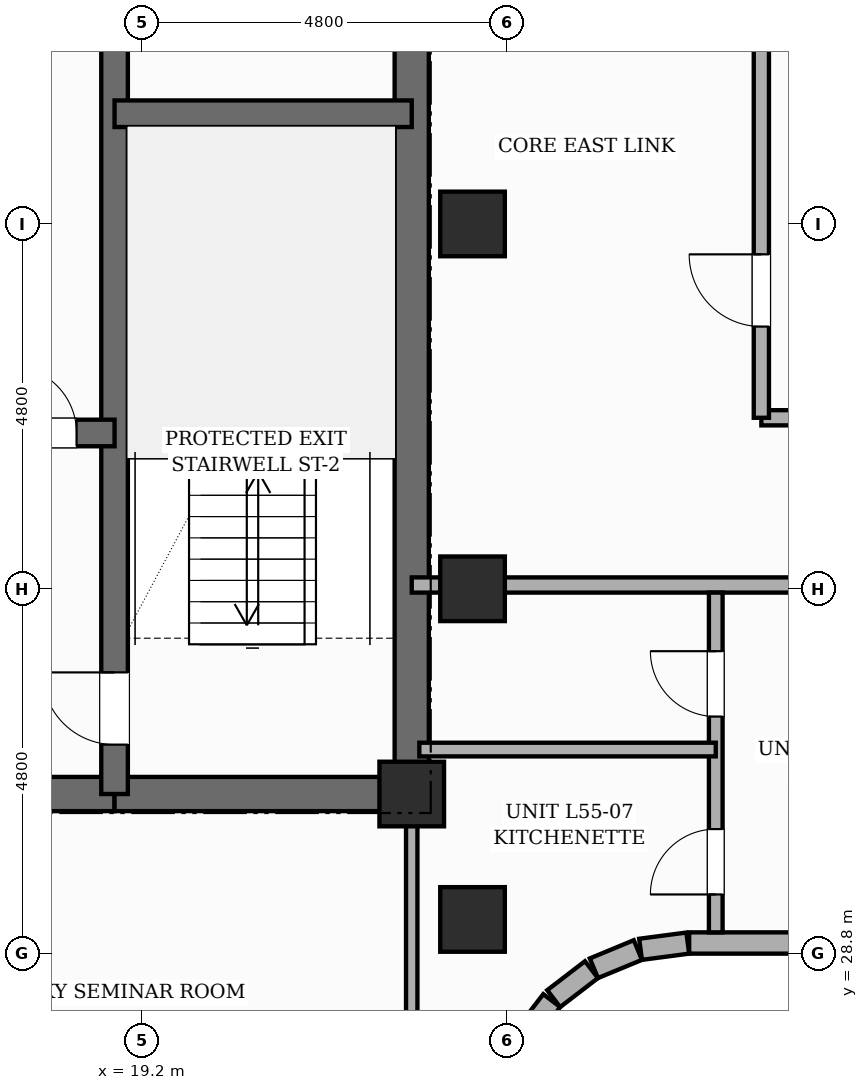
"""IFC4 building model, lengths in metres.
Left out: names, types, materials, properties, quantities, classifications, styles, units other than length and angle.
Written with IfcOpenShell. Run it as: python <this file> out.ifc"""

import sys

from ifc_helpers import new_model, si_unit, direction, frame, frame_2d, origin, origin_2d, place, context, subcontext, project, spatial, rectangle, extrude, element, fill, save


model = new_model("IFC4")
c1 = context("Model", 3, precision=1e-05, world=origin(), true_north=direction((0.0, 1.0)))
c2 = subcontext(c1, "Body", "Model", "MODEL_VIEW")
j1 = project(units=[si_unit("LENGTHUNIT", "METRE"), si_unit("PLANEANGLEUNIT", "RADIAN")], contexts=[c1])
p1 = place(None, origin())
s1 = spatial("IfcSite", under=j1, at=p1, CompositionType="ELEMENT")
p2 = place(p1, origin())
s2 = spatial("IfcBuilding", under=s1, at=p2, CompositionType="ELEMENT")
p3 = place(p2, frame((0.0, 0.0, 211.0)))
s3 = spatial("IfcBuildingStorey", under=s2, at=p3, CompositionType="ELEMENT", Elevation=211.0)
p4 = place(p3, frame((22.75, 30.675, 0.0), z_axis=(0.0, 0.0, 1.0), x_axis=(0.0, 1.0, 0.0)))
e1 = element("IfcWall", 1, at=p4, inside=s3, PredefinedType="SHEAR", context=c2, shape_type="SweptSolid", body=[
    extrude(rectangle(XDim=15.35, YDim=0.45, at=frame_2d((7.675, 0.0))), origin(), (0.0, 0.0, 1.0), 3.6),
])
p5 = place(p4, frame((10.675, 0.0, 0.0)))
e2 = element("IfcOpeningElement", 2, at=p5, cuts=e1, PredefinedType="OPENING", context=c2, shape_type="SweptSolid", body=[
    extrude(rectangle(XDim=1.0, YDim=2.15, at=frame_2d((0.5, 1.075))), frame((0.0, 0.235, 0.0), z_axis=(0.0, -1.0, 0.0), x_axis=(1.0, 0.0, 0.0)), (0.0, 0.0, 1.0), 0.47),
])
p6 = place(p3, frame((9.96, 30.9, 0.0), z_axis=(0.0, 0.0, 1.0), x_axis=(1.0, 0.0, 0.0)))
e3 = element("IfcWall", 3, at=p6, inside=s3, PredefinedType="SHEAR", context=c2, shape_type="SweptSolid", body=[
    extrude(rectangle(XDim=8.88, YDim=0.45, at=frame_2d((4.44, 0.0))), origin(), (0.0, 0.0, 1.0), 3.6),
])
p7 = place(p6, frame((4.09, 0.0, 0.0)))
e4 = element("IfcOpeningElement", 4, at=p7, cuts=e3, PredefinedType="OPENING", context=c2, shape_type="SweptSolid", body=[
    extrude(rectangle(XDim=1.0, YDim=2.15, at=frame_2d((0.5, 1.075))), frame((0.0, 0.235, 0.0), z_axis=(0.0, -1.0, 0.0), x_axis=(1.0, 0.0, 0.0)), (0.0, 0.0, 1.0), 0.47),
])
p8 = place(p3, frame((18.84, 30.9, 0.0), z_axis=(0.0, 0.0, 1.0), x_axis=(1.0, 0.0, 0.0)))
e5 = element("IfcWall", 5, at=p8, inside=s3, PredefinedType="SHEAR", context=c2, shape_type="SweptSolid", body=[
    extrude(rectangle(XDim=3.91, YDim=0.45, at=frame_2d((1.955, 0.0))), origin(), (0.0, 0.0, 1.0), 3.6),
])
p9 = place(p3, frame((18.84, 30.9, 0.0), z_axis=(0.0, 0.0, 1.0), x_axis=(0.0, 1.0, 0.0)))
e6 = element("IfcWall", 6, at=p9, inside=s3, PredefinedType="SHEAR", context=c2, shape_type="SweptSolid", body=[
    extrude(rectangle(XDim=14.9, YDim=0.35, at=frame_2d((7.45, 0.0))), origin(), (0.0, 0.0, 1.0), 3.6),
])
p10 = place(p9, frame((0.65, 0.0, 0.0)))
e7 = element("IfcOpeningElement", 7, at=p10, cuts=e6, PredefinedType="OPENING", context=c2, shape_type="SweptSolid", body=[
    extrude(rectangle(XDim=0.95, YDim=2.1, at=frame_2d((0.475, 1.05))), frame((0.0, 0.185, 0.0), z_axis=(0.0, -1.0, 0.0), x_axis=(1.0, 0.0, 0.0)), (0.0, 0.0, 1.0), 0.37),
])
p11 = place(p9, frame((10.45, 0.0, 0.0)))
e8 = element("IfcOpeningElement", 8, at=p11, cuts=e6, PredefinedType="OPENING", context=c2, shape_type="SweptSolid", body=[
    extrude(rectangle(XDim=1.0, YDim=2.15, at=frame_2d((0.5, 1.075))), frame((0.0, 0.185, 0.0), z_axis=(0.0, -1.0, 0.0), x_axis=(1.0, 0.0, 0.0)), (0.0, 0.0, 1.0), 0.37),
])
p12 = place(p3, frame((18.84, 39.85, 0.0), z_axis=(0.0, 0.0, 1.0), x_axis=(1.0, 0.0, 0.0)))
e9 = element("IfcWall", 9, at=p12, inside=s3, PredefinedType="SHEAR", context=c2, shape_type="SweptSolid", body=[
    extrude(rectangle(XDim=3.91, YDim=0.35, at=frame_2d((1.955, 0.0))), origin(), (0.0, 0.0, 1.0), 3.6),
])
p13 = place(p3, frame((9.96, 35.65, 0.0), z_axis=(0.0, 0.0, 1.0), x_axis=(1.0, 0.0, 0.0)))
e10 = element("IfcWall", 10, at=p13, inside=s3, PredefinedType="SHEAR", context=c2, shape_type="SweptSolid", body=[
    extrude(rectangle(XDim=8.88, YDim=0.35, at=frame_2d((4.44, 0.0))), origin(), (0.0, 0.0, 1.0), 3.6),
])
p14 = place(p13, frame((0.84, 0.0, 0.0)))
e11 = element("IfcOpeningElement", 11, at=p14, cuts=e10, PredefinedType="OPENING", context=c2, shape_type="SweptSolid", body=[
    extrude(rectangle(XDim=1.1, YDim=2.15, at=frame_2d((0.55, 1.075))), frame((0.0, 0.185, 0.0), z_axis=(0.0, -1.0, 0.0), x_axis=(1.0, 0.0, 0.0)), (0.0, 0.0, 1.0), 0.37),
])
p15 = place(p13, frame((5.24, 0.0, 0.0)))
e12 = element("IfcOpeningElement", 12, at=p15, cuts=e10, PredefinedType="OPENING", context=c2, shape_type="SweptSolid", body=[
    extrude(rectangle(XDim=1.1, YDim=2.15, at=frame_2d((0.55, 1.075))), frame((0.0, 0.185, 0.0), z_axis=(0.0, -1.0, 0.0), x_axis=(1.0, 0.0, 0.0)), (0.0, 0.0, 1.0), 0.37),
])
p16 = place(p13, frame((7.5, 0.0, 0.0)))
e13 = element("IfcOpeningElement", 13, at=p16, cuts=e10, PredefinedType="OPENING", context=c2, shape_type="SweptSolid", body=[
    extrude(rectangle(XDim=0.88, YDim=2.1, at=frame_2d((0.44, 1.05))), frame((0.0, 0.185, 0.0), z_axis=(0.0, -1.0, 0.0), x_axis=(1.0, 0.0, 0.0)), (0.0, 0.0, 1.0), 0.37),
])
for number, where, z_axis, x_axis in (
    (14, (22.75, 30.9, 0.0), (0.0, 0.0, 1.0), (1.0, 0.0, 0.0)),
    (15, (23.55, 29.25, 0.0), (0.0, 0.0, 1.0), (1.0, 0.0, 0.0)),
    (16, (23.55, 33.6, 0.0), (0.0, 0.0, 1.0), (1.0, 0.0, 0.0)),
    (17, (23.55, 38.4, 0.0), (0.0, 0.0, 1.0), (1.0, 0.0, 0.0)),
):
    element("IfcColumn", number, at=place(p3, frame(where, z_axis=z_axis, x_axis=x_axis)), inside=s3, PredefinedType="COLUMN", context=c2, shape_type="SweptSolid", body=[
        extrude(rectangle(XDim=0.85, YDim=0.85, at=origin_2d()), origin(), (0.0, 0.0, 1.0), 3.6),
    ])
p17 = place(p3, frame((50.4, 28.94, 0.0), z_axis=(0.0, 0.0, 1.0), x_axis=(-1.0, 0.0, 0.0)))
e18 = element("IfcWall", 18, at=p17, inside=s3, PredefinedType="STANDARD", context=c2, shape_type="SweptSolid", body=[
    extrude(rectangle(XDim=24.0, YDim=0.28, at=frame_2d((12.0, 0.0))), origin(), (0.0, 0.0, 1.0), 2.66),
])
p18 = place(p17, frame((19.177, 0.0, 0.65)))
e19 = element("IfcOpeningElement", 19, at=p18, cuts=e18, PredefinedType="OPENING", context=c2, shape_type="SweptSolid", body=[
    extrude(rectangle(XDim=1.4, YDim=1.1, at=frame_2d((0.7, 0.55))), frame((0.0, 0.15, 0.0), z_axis=(0.0, -1.0, 0.0), x_axis=(1.0, 0.0, 0.0)), (0.0, 0.0, 1.0), 0.3),
])
p19 = place(p17, frame((14.481, 0.0, 0.65)))
e20 = element("IfcOpeningElement", 20, at=p19, cuts=e18, PredefinedType="OPENING", context=c2, shape_type="SweptSolid", body=[
    extrude(rectangle(XDim=1.4, YDim=1.1, at=frame_2d((0.7, 0.55))), frame((0.0, 0.15, 0.0), z_axis=(0.0, -1.0, 0.0), x_axis=(1.0, 0.0, 0.0)), (0.0, 0.0, 1.0), 0.3),
])
p20 = place(p17, frame((4.847, 0.0, 0.65)))
e21 = element("IfcOpeningElement", 21, at=p20, cuts=e18, PredefinedType="OPENING", context=c2, shape_type="SweptSolid", body=[
    extrude(rectangle(XDim=1.4, YDim=1.1, at=frame_2d((0.7, 0.55))), frame((0.0, 0.15, 0.0), z_axis=(0.0, -1.0, 0.0), x_axis=(1.0, 0.0, 0.0)), (0.0, 0.0, 1.0), 0.3),
])
p21 = place(p17, frame((9.377, 0.0, 0.65)))
e22 = element("IfcOpeningElement", 22, at=p21, cuts=e18, PredefinedType="OPENING", context=c2, shape_type="SweptSolid", body=[
    extrude(rectangle(XDim=1.4, YDim=1.1, at=frame_2d((0.7, 0.55))), frame((0.0, 0.15, 0.0), z_axis=(0.0, -1.0, 0.0), x_axis=(1.0, 0.0, 0.0)), (0.0, 0.0, 1.0), 0.3),
])
p22 = place(p17, frame((0.308, 0.0, 0.65)))
e23 = element("IfcOpeningElement", 23, at=p22, cuts=e18, PredefinedType="OPENING", context=c2, shape_type="SweptSolid", body=[
    extrude(rectangle(XDim=1.4, YDim=1.1, at=frame_2d((0.7, 0.55))), frame((0.0, 0.15, 0.0), z_axis=(0.0, -1.0, 0.0), x_axis=(1.0, 0.0, 0.0)), (0.0, 0.0, 1.0), 0.3),
])
p23 = place(p3, frame((26.382, 28.939, 0.0), z_axis=(0.0, 0.0, 1.0), x_axis=(-0.9914410257, -0.130555323746, 0.0)))
e24 = element("IfcWall", 24, at=p23, inside=s3, PredefinedType="STANDARD", context=c2, shape_type="SweptSolid", body=[
    extrude(rectangle(XDim=0.626, YDim=0.28, at=frame_2d((0.313, 0.0))), origin(), (0.0, 0.0, 1.0), 3.38),
])
p24 = place(p3, frame((25.725, 28.847, 0.0), z_axis=(0.0, 0.0, 1.0), x_axis=(-0.923974080304, -0.382455093999, 0.0)))
e25 = element("IfcWall", 25, at=p24, inside=s3, PredefinedType="STANDARD", context=c2, shape_type="SweptSolid", body=[
    extrude(rectangle(XDim=0.626, YDim=0.28, at=frame_2d((0.313, 0.0))), origin(), (0.0, 0.0, 1.0), 3.38),
])
for number, where, z_axis, x_axis in (
    (26, (25.115, 28.59, 0.0), (0.0, 0.0, 1.0), (-0.793, -0.609, 0.0)),
    (27, (24.592, 28.182, 0.0), (0.0, 0.0, 1.0), (-0.609, -0.793, 0.0)),
):
    element("IfcWall", number, at=place(p3, frame(where, z_axis=z_axis, x_axis=x_axis)), inside=s3, PredefinedType="STANDARD", context=c2, shape_type="SweptSolid", body=[
        extrude(rectangle(XDim=0.626, YDim=0.28, at=frame_2d((0.313, 0.0))), origin(), (0.0, 0.0, 1.0), 3.38),
    ])
p25 = place(p3, frame((22.75, 25.75, 0.0), z_axis=(0.0, 0.0, 1.0), x_axis=(0.0, 1.0, 0.0)))
e28 = element("IfcWall", 28, at=p25, inside=s3, PredefinedType="PARTITIONING", context=c2, shape_type="SweptSolid", body=[
    extrude(rectangle(XDim=5.15, YDim=0.15, at=frame_2d((2.575, 0.0))), origin(), (0.0, 0.0, 1.0), 3.38),
])
p26 = place(p3, frame((22.75, 33.65, 0.0), z_axis=(0.0, 0.0, 1.0), x_axis=(1.0, 0.0, 0.0)))
e29 = element("IfcWall", 29, at=p26, inside=s3, PredefinedType="PARTITIONING", context=c2, shape_type="SweptSolid", body=[
    extrude(rectangle(XDim=29.77, YDim=0.2, at=frame_2d((14.885, 0.0))), origin(), (0.0, 0.0, 1.0), 3.38),
])
p27 = place(p26, frame((5.995, 0.0, 0.0)))
e30 = element("IfcOpeningElement", 30, at=p27, cuts=e29, PredefinedType="OPENING", context=c2, shape_type="SweptSolid", body=[
    extrude(rectangle(XDim=0.98, YDim=2.18, at=frame_2d((0.49, 1.09))), frame((0.0, 0.11, 0.0), z_axis=(0.0, -1.0, 0.0), x_axis=(1.0, 0.0, 0.0)), (0.0, 0.0, 1.0), 0.22),
])
p28 = place(p26, frame((10.896, 0.0, 0.0)))
e31 = element("IfcOpeningElement", 31, at=p28, cuts=e29, PredefinedType="OPENING", context=c2, shape_type="SweptSolid", body=[
    extrude(rectangle(XDim=0.98, YDim=2.18, at=frame_2d((0.49, 1.09))), frame((0.0, 0.11, 0.0), z_axis=(0.0, -1.0, 0.0), x_axis=(1.0, 0.0, 0.0)), (0.0, 0.0, 1.0), 0.22),
])
p29 = place(p26, frame((20.73, 0.0, 0.0)))
e32 = element("IfcOpeningElement", 32, at=p29, cuts=e29, PredefinedType="OPENING", context=c2, shape_type="SweptSolid", body=[
    extrude(rectangle(XDim=0.98, YDim=2.18, at=frame_2d((0.49, 1.09))), frame((0.0, 0.11, 0.0), z_axis=(0.0, -1.0, 0.0), x_axis=(1.0, 0.0, 0.0)), (0.0, 0.0, 1.0), 0.22),
])
p30 = place(p3, frame((27.35, 35.85, 0.0), z_axis=(0.0, 0.0, 1.0), x_axis=(1.0, 0.0, 0.0)))
e33 = element("IfcWall", 33, at=p30, inside=s3, PredefinedType="PARTITIONING", context=c2, shape_type="SweptSolid", body=[
    extrude(rectangle(XDim=14.43, YDim=0.2, at=frame_2d((7.215, 0.0))), origin(), (0.0, 0.0, 1.0), 3.38),
])
p31 = place(p30, frame((4.803, 0.0, 0.0)))
e34 = element("IfcOpeningElement", 34, at=p31, cuts=e33, PredefinedType="OPENING", context=c2, shape_type="SweptSolid", body=[
    extrude(rectangle(XDim=0.98, YDim=2.18, at=frame_2d((0.49, 1.09))), frame((0.0, 0.11, 0.0), z_axis=(0.0, -1.0, 0.0), x_axis=(1.0, 0.0, 0.0)), (0.0, 0.0, 1.0), 0.22),
])
p32 = place(p3, frame((27.35, 35.85, 0.0), z_axis=(0.0, 0.0, 1.0), x_axis=(0.0, 1.0, 0.0)))
e35 = element("IfcWall", 35, at=p32, inside=s3, PredefinedType="PARTITIONING", context=c2, shape_type="SweptSolid", body=[
    extrude(rectangle(XDim=11.87, YDim=0.2, at=frame_2d((5.935, 0.0))), origin(), (0.0, 0.0, 1.0), 3.38),
])
p33 = place(p32, frame((1.2, 0.0, 0.0)))
e36 = element("IfcOpeningElement", 36, at=p33, cuts=e35, PredefinedType="OPENING", context=c2, shape_type="SweptSolid", body=[
    extrude(rectangle(XDim=0.95, YDim=2.15, at=frame_2d((0.475, 1.075))), frame((0.0, 0.11, 0.0), z_axis=(0.0, -1.0, 0.0), x_axis=(1.0, 0.0, 0.0)), (0.0, 0.0, 1.0), 0.22),
])
p34 = place(p3, frame((26.75, 29.08, 0.0), z_axis=(0.0, 0.0, 1.0), x_axis=(0.0, 1.0, 0.0)))
e37 = element("IfcWall", 37, at=p34, inside=s3, PredefinedType="PLUMBINGWALL", context=c2, shape_type="SweptSolid", body=[
    extrude(rectangle(XDim=4.47, YDim=0.18, at=frame_2d((2.235, 0.0))), origin(), (0.0, 0.0, 1.0), 3.38),
])
p35 = place(p34, frame((0.499, 0.0, 0.0)))
e38 = element("IfcOpeningElement", 38, at=p35, cuts=e37, PredefinedType="OPENING", context=c2, shape_type="SweptSolid", body=[
    extrude(rectangle(XDim=0.86, YDim=2.1, at=frame_2d((0.43, 1.05))), frame((0.0, 0.1, 0.0), z_axis=(0.0, -1.0, 0.0), x_axis=(1.0, 0.0, 0.0)), (0.0, 0.0, 1.0), 0.2),
])
p36 = place(p34, frame((2.839, 0.0, 0.0)))
e39 = element("IfcOpeningElement", 39, at=p36, cuts=e37, PredefinedType="OPENING", context=c2, shape_type="SweptSolid", body=[
    extrude(rectangle(XDim=0.86, YDim=2.1, at=frame_2d((0.43, 1.05))), frame((0.0, 0.1, 0.0), z_axis=(0.0, -1.0, 0.0), x_axis=(1.0, 0.0, 0.0)), (0.0, 0.0, 1.0), 0.2),
])
p37 = place(p3, frame((22.85, 31.485, 0.0), z_axis=(0.0, 0.0, 1.0), x_axis=(1.0, 0.0, 0.0)))
e40 = element("IfcWall", 40, at=p37, inside=s3, PredefinedType="PLUMBINGWALL", context=c2, shape_type="SweptSolid", body=[
    extrude(rectangle(XDim=3.9, YDim=0.18, at=frame_2d((1.95, 0.0))), origin(), (0.0, 0.0, 1.0), 3.38),
])
p38 = place(p10, origin())
e41 = element("IfcDoor", 41, at=p38, inside=s3, OperationType="SINGLE_SWING_RIGHT", PredefinedType="DOOR", context=c2, shape_type="SweptSolid", body=[
    extrude(rectangle(XDim=0.95, YDim=2.1, at=frame_2d((0.475, 1.05))), frame((0.0, 0.025, 0.0), z_axis=(0.0, -1.0, 0.0), x_axis=(1.0, 0.0, 0.0)), (0.0, 0.0, 1.0), 0.05),
])
fill(e7, e41)
p39 = place(p16, origin())
e42 = element("IfcDoor", 42, at=p39, inside=s3, OperationType="SINGLE_SWING_LEFT", PredefinedType="DOOR", context=c2, shape_type="SweptSolid", body=[
    extrude(rectangle(XDim=0.88, YDim=2.1, at=frame_2d((0.44, 1.05))), frame((0.0, 0.025, 0.0), z_axis=(0.0, -1.0, 0.0), x_axis=(1.0, 0.0, 0.0)), (0.0, 0.0, 1.0), 0.05),
])
fill(e13, e42)
p40 = place(p35, origin())
e43 = element("IfcDoor", 43, at=p40, inside=s3, OperationType="SINGLE_SWING_LEFT", PredefinedType="DOOR", context=c2, shape_type="SweptSolid", body=[
    extrude(rectangle(XDim=0.86, YDim=2.1, at=frame_2d((0.43, 1.05))), frame((0.0, 0.025, 0.0), z_axis=(0.0, -1.0, 0.0), x_axis=(1.0, 0.0, 0.0)), (0.0, 0.0, 1.0), 0.05),
])
fill(e38, e43)
p41 = place(p36, origin())
e44 = element("IfcDoor", 44, at=p41, inside=s3, OperationType="SINGLE_SWING_RIGHT", PredefinedType="DOOR", context=c2, shape_type="SweptSolid", body=[
    extrude(rectangle(XDim=0.86, YDim=2.1, at=frame_2d((0.43, 1.05))), frame((0.0, 0.025, 0.0), z_axis=(0.0, -1.0, 0.0), x_axis=(1.0, 0.0, 0.0)), (0.0, 0.0, 1.0), 0.05),
])
fill(e39, e44)
p42 = place(p33, origin())
e45 = element("IfcDoor", 45, at=p42, inside=s3, OperationType="SINGLE_SWING_RIGHT", PredefinedType="DOOR", context=c2, shape_type="SweptSolid", body=[
    extrude(rectangle(XDim=0.95, YDim=2.15, at=frame_2d((0.475, 1.075))), frame((0.0, 0.025, 0.0), z_axis=(0.0, -1.0, 0.0), x_axis=(1.0, 0.0, 0.0)), (0.0, 0.0, 1.0), 0.05),
])
fill(e36, e45)
save(model, sys.argv[1])
